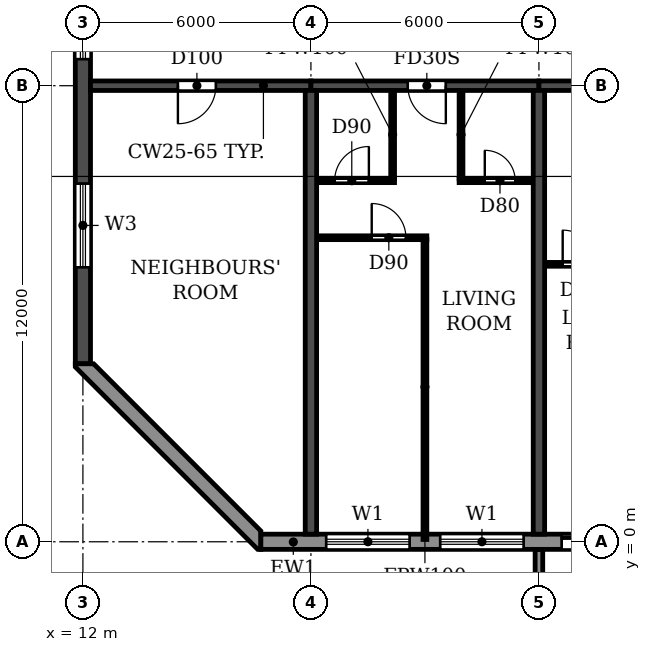
"""IFC4 building model, lengths in metres.
Left out: names, types, materials, properties, quantities, classifications, styles, units other than length and angle.
Written with IfcOpenShell. Run it as: python <this file> out.ifc"""

import sys

from ifc_helpers import new_model, si_unit, direction, frame, frame_2d, origin, place, context, subcontext, project, spatial, polyline, rectangle, outline, extrude, source, transform, mapped, element, fill, save


model = new_model("IFC4")
c1 = context("Model", 3, precision=1e-05, world=origin(), true_north=direction((0.0, 1.0)))
c2 = subcontext(c1, "Body", "Model", "MODEL_VIEW")
j1 = project(units=[si_unit("LENGTHUNIT", "METRE"), si_unit("PLANEANGLEUNIT", "RADIAN")], contexts=[c1])
p1 = place(None, origin())
s1 = spatial("IfcSite", under=j1, at=p1, CompositionType="ELEMENT")
p2 = place(p1, origin())
s2 = spatial("IfcBuilding", under=s1, at=p2, CompositionType="ELEMENT")
p3 = place(p2, frame((0.0, 0.0, 155.4)))
s3 = spatial("IfcBuildingStorey", under=s2, at=p3, CompositionType="ELEMENT", Elevation=155.4)
for number, where, z_axis, x_axis in (
    (1, (18.0, 0.2, 0.0), (0.0, 0.0, 1.0), (0.0, 1.0, 0.0)),
    (2, (24.0, 0.2, 0.0), (0.0, 0.0, 1.0), (0.0, 1.0, 0.0)),
):
    element("IfcWall", number, at=place(p3, frame(where, z_axis=z_axis, x_axis=x_axis)), inside=s3, PredefinedType="SHEAR", context=c2, shape_type="SweptSolid", body=[
        extrude(rectangle(XDim=11.675, YDim=0.3, at=frame_2d((5.837, 0.0))), origin(), (0.0, 0.0, 1.0), 3.0),
    ])
p4 = place(p3, frame((12.0, 4.683, 0.0), z_axis=(0.0, 0.0, 1.0), x_axis=(0.0, 1.0, 0.0)))
e3 = element("IfcWall", 3, at=p4, inside=s3, PredefinedType="SHEAR", context=c2, shape_type="SweptSolid", body=[
    extrude(rectangle(XDim=33.034, YDim=0.4, at=frame_2d((16.517, 0.0))), origin(), (0.0, 0.0, 1.0), 3.0),
])
p5 = place(p4, frame((23.817, 0.0, 0.9)))
e4 = element("IfcOpeningElement", 4, at=p5, cuts=e3, PredefinedType="OPENING", context=c2, shape_type="SweptSolid", body=[
    extrude(rectangle(XDim=1.2, YDim=1.5, at=frame_2d((0.6, 0.75))), frame((0.0, 0.21, 0.0), z_axis=(0.0, -1.0, 0.0), x_axis=(1.0, 0.0, 0.0)), (0.0, 0.0, 1.0), 0.42),
])
p6 = place(p4, frame((8.017, 0.0, 0.9)))
e5 = element("IfcOpeningElement", 5, at=p6, cuts=e3, PredefinedType="OPENING", context=c2, shape_type="SweptSolid", body=[
    extrude(rectangle(XDim=1.2, YDim=1.5, at=frame_2d((0.6, 0.75))), frame((0.0, 0.21, 0.0), z_axis=(0.0, -1.0, 0.0), x_axis=(1.0, 0.0, 0.0)), (0.0, 0.0, 1.0), 0.42),
])
p7 = place(p4, frame((28.293, 0.0, 0.6)))
e6 = element("IfcOpeningElement", 6, at=p7, cuts=e3, PredefinedType="OPENING", context=c2, shape_type="SweptSolid", body=[
    extrude(rectangle(XDim=2.2, YDim=1.8, at=frame_2d((1.1, 0.9))), frame((0.0, 0.21, 0.0), z_axis=(0.0, -1.0, 0.0), x_axis=(1.0, 0.0, 0.0)), (0.0, 0.0, 1.0), 0.42),
])
p8 = place(p4, frame((2.541, 0.0, 0.6)))
e7 = element("IfcOpeningElement", 7, at=p8, cuts=e3, PredefinedType="OPENING", context=c2, shape_type="SweptSolid", body=[
    extrude(rectangle(XDim=2.2, YDim=1.8, at=frame_2d((1.1, 0.9))), frame((0.0, 0.21, 0.0), z_axis=(0.0, -1.0, 0.0), x_axis=(1.0, 0.0, 0.0)), (0.0, 0.0, 1.0), 0.42),
])
p9 = place(p3, frame((12.2, 12.0, 0.0), z_axis=(0.0, 0.0, 1.0), x_axis=(1.0, 0.0, 0.0)))
e8 = element("IfcWall", 8, at=p9, inside=s3, PredefinedType="SHEAR", context=c2, shape_type="SweptSolid", body=[
    extrude(rectangle(XDim=5.8, YDim=0.25, at=frame_2d((2.9, 0.0))), origin(), (0.0, 0.0, 1.0), 2.4),
])
p10 = place(p9, frame((2.3, 0.0, 0.0)))
e9 = element("IfcOpeningElement", 9, at=p10, cuts=e8, PredefinedType="OPENING", context=c2, shape_type="SweptSolid", body=[
    extrude(rectangle(XDim=1.0, YDim=2.1, at=frame_2d((0.5, 1.05))), frame((0.0, 0.135, 0.0), z_axis=(0.0, -1.0, 0.0), x_axis=(1.0, 0.0, 0.0)), (0.0, 0.0, 1.0), 0.27),
])
p11 = place(p3, frame((18.0, 12.0, 0.0), z_axis=(0.0, 0.0, 1.0), x_axis=(1.0, 0.0, 0.0)))
e10 = element("IfcWall", 10, at=p11, inside=s3, PredefinedType="SHEAR", context=c2, shape_type="SweptSolid", body=[
    extrude(rectangle(XDim=6.0, YDim=0.25, at=frame_2d((3.0, 0.0))), origin(), (0.0, 0.0, 1.0), 2.4),
])
p12 = place(p11, frame((2.55, 0.0, 0.0)))
e11 = element("IfcOpeningElement", 11, at=p12, cuts=e10, PredefinedType="OPENING", context=c2, shape_type="SweptSolid", body=[
    extrude(rectangle(XDim=1.0, YDim=2.1, at=frame_2d((0.5, 1.05))), frame((0.0, 0.135, 0.0), z_axis=(0.0, -1.0, 0.0), x_axis=(1.0, 0.0, 0.0)), (0.0, 0.0, 1.0), 0.27),
])
p13 = place(p3, frame((24.0, 12.0, 0.0), z_axis=(0.0, 0.0, 1.0), x_axis=(1.0, 0.0, 0.0)))
e12 = element("IfcWall", 12, at=p13, inside=s3, PredefinedType="SHEAR", context=c2, shape_type="SweptSolid", body=[
    extrude(rectangle(XDim=6.0, YDim=0.25, at=frame_2d((3.0, 0.0))), origin(), (0.0, 0.0, 1.0), 2.4),
])
p14 = place(p13, frame((2.55, 0.0, 0.0)))
e13 = element("IfcOpeningElement", 13, at=p14, cuts=e12, PredefinedType="OPENING", context=c2, shape_type="SweptSolid", body=[
    extrude(rectangle(XDim=1.0, YDim=2.1, at=frame_2d((0.5, 1.05))), frame((0.0, 0.135, 0.0), z_axis=(0.0, -1.0, 0.0), x_axis=(1.0, 0.0, 0.0)), (0.0, 0.0, 1.0), 0.27),
])
p15 = place(p3, frame((16.683, 0.0, 0.0), z_axis=(0.0, 0.0, 1.0), x_axis=(1.0, 0.0, 0.0)))
e14 = element("IfcWall", 14, at=p15, inside=s3, PredefinedType="STANDARD", context=c2, shape_type="SweptSolid", body=[
    extrude(rectangle(XDim=68.634, YDim=0.4, at=frame_2d((34.317, 0.0))), origin(), (0.0, 0.0, 1.0), 3.0),
])
p16 = place(p15, frame((1.717, 0.0, 0.9)))
e15 = element("IfcOpeningElement", 15, at=p16, cuts=e14, PredefinedType="OPENING", context=c2, shape_type="SweptSolid", body=[
    extrude(rectangle(XDim=2.2, YDim=1.5, at=frame_2d((1.1, 0.75))), frame((0.0, 0.21, 0.0), z_axis=(0.0, -1.0, 0.0), x_axis=(1.0, 0.0, 0.0)), (0.0, 0.0, 1.0), 0.42),
])
p17 = place(p15, frame((4.717, 0.0, 0.9)))
e16 = element("IfcOpeningElement", 16, at=p17, cuts=e14, PredefinedType="OPENING", context=c2, shape_type="SweptSolid", body=[
    extrude(rectangle(XDim=2.2, YDim=1.5, at=frame_2d((1.1, 0.75))), frame((0.0, 0.21, 0.0), z_axis=(0.0, -1.0, 0.0), x_axis=(1.0, 0.0, 0.0)), (0.0, 0.0, 1.0), 0.42),
])
p18 = place(p15, frame((7.917, 0.0, 0.0)))
e17 = element("IfcOpeningElement", 17, at=p18, cuts=e14, PredefinedType="OPENING", context=c2, shape_type="SweptSolid", body=[
    extrude(rectangle(XDim=1.8, YDim=2.4, at=frame_2d((0.9, 1.2))), frame((0.0, 0.21, 0.0), z_axis=(0.0, -1.0, 0.0), x_axis=(1.0, 0.0, 0.0)), (0.0, 0.0, 1.0), 0.42),
])
p19 = place(p15, frame((10.717, 0.0, 0.9)))
e18 = element("IfcOpeningElement", 18, at=p19, cuts=e14, PredefinedType="OPENING", context=c2, shape_type="SweptSolid", body=[
    extrude(rectangle(XDim=2.2, YDim=1.5, at=frame_2d((1.1, 0.75))), frame((0.0, 0.21, 0.0), z_axis=(0.0, -1.0, 0.0), x_axis=(1.0, 0.0, 0.0)), (0.0, 0.0, 1.0), 0.42),
])
p20 = place(p15, frame((13.717, 0.0, 0.9)))
e19 = element("IfcOpeningElement", 19, at=p20, cuts=e14, PredefinedType="OPENING", context=c2, shape_type="SweptSolid", body=[
    extrude(rectangle(XDim=2.2, YDim=1.5, at=frame_2d((1.1, 0.75))), frame((0.0, 0.21, 0.0), z_axis=(0.0, -1.0, 0.0), x_axis=(1.0, 0.0, 0.0)), (0.0, 0.0, 1.0), 0.42),
])
p21 = place(p15, frame((16.717, 0.0, 0.9)))
e20 = element("IfcOpeningElement", 20, at=p21, cuts=e14, PredefinedType="OPENING", context=c2, shape_type="SweptSolid", body=[
    extrude(rectangle(XDim=2.2, YDim=1.5, at=frame_2d((1.1, 0.75))), frame((0.0, 0.21, 0.0), z_axis=(0.0, -1.0, 0.0), x_axis=(1.0, 0.0, 0.0)), (0.0, 0.0, 1.0), 0.42),
])
p22 = place(p15, frame((19.717, 0.0, 0.9)))
e21 = element("IfcOpeningElement", 21, at=p22, cuts=e14, PredefinedType="OPENING", context=c2, shape_type="SweptSolid", body=[
    extrude(rectangle(XDim=2.2, YDim=1.5, at=frame_2d((1.1, 0.75))), frame((0.0, 0.21, 0.0), z_axis=(0.0, -1.0, 0.0), x_axis=(1.0, 0.0, 0.0)), (0.0, 0.0, 1.0), 0.42),
])
p23 = place(p15, frame((22.917, 0.0, 0.0)))
e22 = element("IfcOpeningElement", 22, at=p23, cuts=e14, PredefinedType="OPENING", context=c2, shape_type="SweptSolid", body=[
    extrude(rectangle(XDim=1.8, YDim=2.4, at=frame_2d((0.9, 1.2))), frame((0.0, 0.21, 0.0), z_axis=(0.0, -1.0, 0.0), x_axis=(1.0, 0.0, 0.0)), (0.0, 0.0, 1.0), 0.42),
])
p24 = place(p15, frame((25.717, 0.0, 0.9)))
e23 = element("IfcOpeningElement", 23, at=p24, cuts=e14, PredefinedType="OPENING", context=c2, shape_type="SweptSolid", body=[
    extrude(rectangle(XDim=2.2, YDim=1.5, at=frame_2d((1.1, 0.75))), frame((0.0, 0.21, 0.0), z_axis=(0.0, -1.0, 0.0), x_axis=(1.0, 0.0, 0.0)), (0.0, 0.0, 1.0), 0.42),
])
p25 = place(p15, frame((28.717, 0.0, 0.9)))
e24 = element("IfcOpeningElement", 24, at=p25, cuts=e14, PredefinedType="OPENING", context=c2, shape_type="SweptSolid", body=[
    extrude(rectangle(XDim=2.2, YDim=1.5, at=frame_2d((1.1, 0.75))), frame((0.0, 0.21, 0.0), z_axis=(0.0, -1.0, 0.0), x_axis=(1.0, 0.0, 0.0)), (0.0, 0.0, 1.0), 0.42),
])
p26 = place(p15, frame((31.917, 0.0, 0.0)))
e25 = element("IfcOpeningElement", 25, at=p26, cuts=e14, PredefinedType="OPENING", context=c2, shape_type="SweptSolid", body=[
    extrude(rectangle(XDim=1.8, YDim=2.4, at=frame_2d((0.9, 1.2))), frame((0.0, 0.21, 0.0), z_axis=(0.0, -1.0, 0.0), x_axis=(1.0, 0.0, 0.0)), (0.0, 0.0, 1.0), 0.42),
])
p27 = place(p15, frame((34.717, 0.0, 0.9)))
e26 = element("IfcOpeningElement", 26, at=p27, cuts=e14, PredefinedType="OPENING", context=c2, shape_type="SweptSolid", body=[
    extrude(rectangle(XDim=2.2, YDim=1.5, at=frame_2d((1.1, 0.75))), frame((0.0, 0.21, 0.0), z_axis=(0.0, -1.0, 0.0), x_axis=(1.0, 0.0, 0.0)), (0.0, 0.0, 1.0), 0.42),
])
p28 = place(p15, frame((37.717, 0.0, 0.9)))
e27 = element("IfcOpeningElement", 27, at=p28, cuts=e14, PredefinedType="OPENING", context=c2, shape_type="SweptSolid", body=[
    extrude(rectangle(XDim=2.2, YDim=1.5, at=frame_2d((1.1, 0.75))), frame((0.0, 0.21, 0.0), z_axis=(0.0, -1.0, 0.0), x_axis=(1.0, 0.0, 0.0)), (0.0, 0.0, 1.0), 0.42),
])
p29 = place(p15, frame((40.717, 0.0, 0.9)))
e28 = element("IfcOpeningElement", 28, at=p29, cuts=e14, PredefinedType="OPENING", context=c2, shape_type="SweptSolid", body=[
    extrude(rectangle(XDim=2.2, YDim=1.5, at=frame_2d((1.1, 0.75))), frame((0.0, 0.21, 0.0), z_axis=(0.0, -1.0, 0.0), x_axis=(1.0, 0.0, 0.0)), (0.0, 0.0, 1.0), 0.42),
])
p30 = place(p15, frame((43.717, 0.0, 0.9)))
e29 = element("IfcOpeningElement", 29, at=p30, cuts=e14, PredefinedType="OPENING", context=c2, shape_type="SweptSolid", body=[
    extrude(rectangle(XDim=2.2, YDim=1.5, at=frame_2d((1.1, 0.75))), frame((0.0, 0.21, 0.0), z_axis=(0.0, -1.0, 0.0), x_axis=(1.0, 0.0, 0.0)), (0.0, 0.0, 1.0), 0.42),
])
p31 = place(p15, frame((46.917, 0.0, 0.0)))
e30 = element("IfcOpeningElement", 30, at=p31, cuts=e14, PredefinedType="OPENING", context=c2, shape_type="SweptSolid", body=[
    extrude(rectangle(XDim=1.8, YDim=2.4, at=frame_2d((0.9, 1.2))), frame((0.0, 0.21, 0.0), z_axis=(0.0, -1.0, 0.0), x_axis=(1.0, 0.0, 0.0)), (0.0, 0.0, 1.0), 0.42),
])
p32 = place(p15, frame((49.717, 0.0, 0.9)))
e31 = element("IfcOpeningElement", 31, at=p32, cuts=e14, PredefinedType="OPENING", context=c2, shape_type="SweptSolid", body=[
    extrude(rectangle(XDim=2.2, YDim=1.5, at=frame_2d((1.1, 0.75))), frame((0.0, 0.21, 0.0), z_axis=(0.0, -1.0, 0.0), x_axis=(1.0, 0.0, 0.0)), (0.0, 0.0, 1.0), 0.42),
])
p33 = place(p15, frame((52.717, 0.0, 0.9)))
e32 = element("IfcOpeningElement", 32, at=p33, cuts=e14, PredefinedType="OPENING", context=c2, shape_type="SweptSolid", body=[
    extrude(rectangle(XDim=2.2, YDim=1.5, at=frame_2d((1.1, 0.75))), frame((0.0, 0.21, 0.0), z_axis=(0.0, -1.0, 0.0), x_axis=(1.0, 0.0, 0.0)), (0.0, 0.0, 1.0), 0.42),
])
p34 = place(p15, frame((55.717, 0.0, 0.9)))
e33 = element("IfcOpeningElement", 33, at=p34, cuts=e14, PredefinedType="OPENING", context=c2, shape_type="SweptSolid", body=[
    extrude(rectangle(XDim=2.2, YDim=1.5, at=frame_2d((1.1, 0.75))), frame((0.0, 0.21, 0.0), z_axis=(0.0, -1.0, 0.0), x_axis=(1.0, 0.0, 0.0)), (0.0, 0.0, 1.0), 0.42),
])
p35 = place(p15, frame((58.917, 0.0, 0.0)))
e34 = element("IfcOpeningElement", 34, at=p35, cuts=e14, PredefinedType="OPENING", context=c2, shape_type="SweptSolid", body=[
    extrude(rectangle(XDim=1.8, YDim=2.4, at=frame_2d((0.9, 1.2))), frame((0.0, 0.21, 0.0), z_axis=(0.0, -1.0, 0.0), x_axis=(1.0, 0.0, 0.0)), (0.0, 0.0, 1.0), 0.42),
])
p36 = place(p15, frame((61.717, 0.0, 0.9)))
e35 = element("IfcOpeningElement", 35, at=p36, cuts=e14, PredefinedType="OPENING", context=c2, shape_type="SweptSolid", body=[
    extrude(rectangle(XDim=2.2, YDim=1.5, at=frame_2d((1.1, 0.75))), frame((0.0, 0.21, 0.0), z_axis=(0.0, -1.0, 0.0), x_axis=(1.0, 0.0, 0.0)), (0.0, 0.0, 1.0), 0.42),
])
p37 = place(p15, frame((64.717, 0.0, 0.9)))
e36 = element("IfcOpeningElement", 36, at=p37, cuts=e14, PredefinedType="OPENING", context=c2, shape_type="SweptSolid", body=[
    extrude(rectangle(XDim=2.2, YDim=1.5, at=frame_2d((1.1, 0.75))), frame((0.0, 0.21, 0.0), z_axis=(0.0, -1.0, 0.0), x_axis=(1.0, 0.0, 0.0)), (0.0, 0.0, 1.0), 0.42),
])
p38 = place(p3, origin())
e37 = element("IfcWall", 37, at=p38, inside=s3, PredefinedType="STANDARD", context=c2, shape_type="SweptSolid", body=[
    extrude(outline(polyline([(11.8, 4.683), (11.8, 4.6), (16.6, -0.2), (16.683, -0.2), (16.683, 0.283), (12.283, 4.683), (11.8, 4.683)])), origin(), (0.0, 0.0, 1.0), 3.0),
])
m1 = source(origin(), c2, "Body", "SweptSolid", [
    extrude(outline(polyline([(0.0, 0.0), (0.2, 0.0), (0.2, 1.65), (0.0, 1.65), (0.0, 0.0)])), origin(), (0.0, 0.0, 1.0), 3.1),
])
p39 = place(p3, frame((23.9, -1.85, 0.0)))
e38 = element("IfcWall", 38, at=p39, inside=s3, PredefinedType="STANDARD", context=c2, shape_type="MappedRepresentation", body=[
    mapped(m1, transform((0.0, 0.0, 0.0))),
])
p40 = place(p3, frame((24.16, 7.3, 0.0), z_axis=(0.0, 0.0, 1.0), x_axis=(1.0, 0.0, 0.0)))
e39 = element("IfcWall", 39, at=p40, inside=s3, PredefinedType="PARTITIONING", context=c2, shape_type="SweptSolid", body=[
    extrude(rectangle(XDim=2.04, YDim=0.1, at=frame_2d((1.02, 0.0))), origin(), (0.0, 0.0, 1.0), 3.0),
])
p41 = place(p40, frame((0.465, 0.0, 0.0)))
e40 = element("IfcOpeningElement", 40, at=p41, cuts=e39, PredefinedType="OPENING", context=c2, shape_type="SweptSolid", body=[
    extrude(rectangle(XDim=0.9, YDim=2.1, at=frame_2d((0.45, 1.05))), frame((0.0, 0.06, 0.0), z_axis=(0.0, -1.0, 0.0), x_axis=(1.0, 0.0, 0.0)), (0.0, 0.0, 1.0), 0.12),
])
p42 = place(p3, frame((18.16, 8.0, 0.0), z_axis=(0.0, 0.0, 1.0), x_axis=(1.0, 0.0, 0.0)))
e41 = element("IfcWall", 41, at=p42, inside=s3, PredefinedType="PARTITIONING", context=c2, shape_type="SweptSolid", body=[
    extrude(rectangle(XDim=2.89, YDim=0.1, at=frame_2d((1.445, 0.0))), origin(), (0.0, 0.0, 1.0), 3.0),
])
p43 = place(p42, frame((1.44, 0.0, 0.0)))
e42 = element("IfcOpeningElement", 42, at=p43, cuts=e41, PredefinedType="OPENING", context=c2, shape_type="SweptSolid", body=[
    extrude(rectangle(XDim=0.9, YDim=2.1, at=frame_2d((0.45, 1.05))), frame((0.0, 0.06, 0.0), z_axis=(0.0, -1.0, 0.0), x_axis=(1.0, 0.0, 0.0)), (0.0, 0.0, 1.0), 0.12),
])
p44 = place(p3, frame((18.16, 9.5, 0.0), z_axis=(0.0, 0.0, 1.0), x_axis=(1.0, 0.0, 0.0)))
e43 = element("IfcWall", 43, at=p44, inside=s3, PredefinedType="PARTITIONING", context=c2, shape_type="SweptSolid", body=[
    extrude(rectangle(XDim=2.04, YDim=0.1, at=frame_2d((1.02, 0.0))), origin(), (0.0, 0.0, 1.0), 3.0),
])
p45 = place(p44, frame((0.465, 0.0, 0.0)))
e44 = element("IfcOpeningElement", 44, at=p45, cuts=e43, PredefinedType="OPENING", context=c2, shape_type="SweptSolid", body=[
    extrude(rectangle(XDim=0.9, YDim=2.1, at=frame_2d((0.45, 1.05))), frame((0.0, 0.06, 0.0), z_axis=(0.0, -1.0, 0.0), x_axis=(1.0, 0.0, 0.0)), (0.0, 0.0, 1.0), 0.12),
])
p46 = place(p3, frame((21.9, 9.5, 0.0), z_axis=(0.0, 0.0, 1.0), x_axis=(1.0, 0.0, 0.0)))
e45 = element("IfcWall", 45, at=p46, inside=s3, PredefinedType="PARTITIONING", context=c2, shape_type="SweptSolid", body=[
    extrude(rectangle(XDim=1.94, YDim=0.1, at=frame_2d((0.97, 0.0))), origin(), (0.0, 0.0, 1.0), 3.0),
])
p47 = place(p46, frame((0.675, 0.0, 0.0)))
e46 = element("IfcOpeningElement", 46, at=p47, cuts=e45, PredefinedType="OPENING", context=c2, shape_type="SweptSolid", body=[
    extrude(rectangle(XDim=0.8, YDim=2.1, at=frame_2d((0.4, 1.05))), frame((0.0, 0.06, 0.0), z_axis=(0.0, -1.0, 0.0), x_axis=(1.0, 0.0, 0.0)), (0.0, 0.0, 1.0), 0.12),
])
p48 = place(p3, frame((20.15, 9.55, 0.0), z_axis=(0.0, 0.0, 1.0), x_axis=(0.0, 1.0, 0.0)))
e47 = element("IfcWall", 47, at=p48, inside=s3, PredefinedType="PARTITIONING", context=c2, shape_type="SweptSolid", body=[
    extrude(rectangle(XDim=2.315, YDim=0.1, at=frame_2d((1.157, 0.0))), origin(), (0.0, 0.0, 1.0), 3.0),
])
p49 = place(p3, frame((21.0, 0.06, 0.0), z_axis=(0.0, 0.0, 1.0), x_axis=(0.0, 1.0, 0.0)))
e48 = element("IfcWall", 48, at=p49, inside=s3, PredefinedType="PARTITIONING", context=c2, shape_type="SweptSolid", body=[
    extrude(rectangle(XDim=7.89, YDim=0.1, at=frame_2d((3.945, 0.0))), origin(), (0.0, 0.0, 1.0), 3.0),
])
p50 = place(p3, frame((21.95, 9.55, 0.0), z_axis=(0.0, 0.0, 1.0), x_axis=(0.0, 1.0, 0.0)))
e49 = element("IfcWall", 49, at=p50, inside=s3, PredefinedType="PARTITIONING", context=c2, shape_type="SweptSolid", body=[
    extrude(rectangle(XDim=2.315, YDim=0.1, at=frame_2d((1.157, 0.0))), origin(), (0.0, 0.0, 1.0), 3.0),
])
p51 = place(p16, origin())
e50 = element("IfcWindow", 50, at=p51, inside=s3, PartitioningType="DOUBLE_PANEL_HORIZONTAL", PredefinedType="WINDOW", context=c2, shape_type="SweptSolid", body=[
    extrude(rectangle(XDim=2.2, YDim=1.5, at=frame_2d((1.1, 0.75))), frame((0.0, 0.03, 0.0), z_axis=(0.0, -1.0, 0.0), x_axis=(1.0, 0.0, 0.0)), (0.0, 0.0, 1.0), 0.06),
])
fill(e15, e50)
p52 = place(p17, origin())
e51 = element("IfcWindow", 51, at=p52, inside=s3, PartitioningType="DOUBLE_PANEL_HORIZONTAL", PredefinedType="WINDOW", context=c2, shape_type="SweptSolid", body=[
    extrude(rectangle(XDim=2.2, YDim=1.5, at=frame_2d((1.1, 0.75))), frame((0.0, 0.03, 0.0), z_axis=(0.0, -1.0, 0.0), x_axis=(1.0, 0.0, 0.0)), (0.0, 0.0, 1.0), 0.06),
])
fill(e16, e51)
p53 = place(p18, origin())
e52 = element("IfcDoor", 52, at=p53, inside=s3, OperationType="DOUBLE_DOOR_SLIDING", PredefinedType="DOOR", context=c2, shape_type="SweptSolid", body=[
    extrude(rectangle(XDim=1.8, YDim=2.4, at=frame_2d((0.9, 1.2))), frame((0.0, 0.025, 0.0), z_axis=(0.0, -1.0, 0.0), x_axis=(1.0, 0.0, 0.0)), (0.0, 0.0, 1.0), 0.05),
])
fill(e17, e52)
p54 = place(p6, origin())
e53 = element("IfcWindow", 53, at=p54, inside=s3, PartitioningType="SINGLE_PANEL", PredefinedType="WINDOW", context=c2, shape_type="SweptSolid", body=[
    extrude(rectangle(XDim=1.2, YDim=1.5, at=frame_2d((0.6, 0.75))), frame((0.0, 0.03, 0.0), z_axis=(0.0, -1.0, 0.0), x_axis=(1.0, 0.0, 0.0)), (0.0, 0.0, 1.0), 0.06),
])
fill(e5, e53)
p55 = place(p8, origin())
e54 = element("IfcWindow", 54, at=p55, inside=s3, PartitioningType="DOUBLE_PANEL_HORIZONTAL", PredefinedType="WINDOW", context=c2, shape_type="SweptSolid", body=[
    extrude(rectangle(XDim=2.2, YDim=1.8, at=frame_2d((1.1, 0.9))), frame((0.0, 0.03, 0.0), z_axis=(0.0, -1.0, 0.0), x_axis=(1.0, 0.0, 0.0)), (0.0, 0.0, 1.0), 0.06),
])
fill(e7, e54)
p56 = place(p10, frame((1.0, 0.0, 0.0), z_axis=(0.0, 0.0, 1.0), x_axis=(-1.0, 0.0, 0.0)))
e55 = element("IfcDoor", 55, at=p56, inside=s3, OperationType="SINGLE_SWING_RIGHT", PredefinedType="DOOR", context=c2, shape_type="SweptSolid", body=[
    extrude(rectangle(XDim=1.0, YDim=2.1, at=frame_2d((0.5, 1.05))), frame((0.0, 0.025, 0.0), z_axis=(0.0, -1.0, 0.0), x_axis=(1.0, 0.0, 0.0)), (0.0, 0.0, 1.0), 0.05),
])
fill(e9, e55)
p57 = place(p45, origin())
e56 = element("IfcDoor", 56, at=p57, inside=s3, OperationType="SINGLE_SWING_RIGHT", PredefinedType="DOOR", context=c2, shape_type="SweptSolid", body=[
    extrude(rectangle(XDim=0.9, YDim=2.1, at=frame_2d((0.45, 1.05))), frame((0.0, 0.025, 0.0), z_axis=(0.0, -1.0, 0.0), x_axis=(1.0, 0.0, 0.0)), (0.0, 0.0, 1.0), 0.05),
])
fill(e44, e56)
p58 = place(p43, origin())
e57 = element("IfcDoor", 57, at=p58, inside=s3, OperationType="SINGLE_SWING_LEFT", PredefinedType="DOOR", context=c2, shape_type="SweptSolid", body=[
    extrude(rectangle(XDim=0.9, YDim=2.1, at=frame_2d((0.45, 1.05))), frame((0.0, 0.025, 0.0), z_axis=(0.0, -1.0, 0.0), x_axis=(1.0, 0.0, 0.0)), (0.0, 0.0, 1.0), 0.05),
])
fill(e42, e57)
p59 = place(p12, frame((1.0, 0.0, 0.0), z_axis=(0.0, 0.0, 1.0), x_axis=(-1.0, 0.0, 0.0)))
e58 = element("IfcDoor", 58, at=p59, inside=s3, OperationType="SINGLE_SWING_LEFT", PredefinedType="DOOR", context=c2, shape_type="SweptSolid", body=[
    extrude(rectangle(XDim=1.0, YDim=2.1, at=frame_2d((0.5, 1.05))), frame((0.0, 0.025, 0.0), z_axis=(0.0, -1.0, 0.0), x_axis=(1.0, 0.0, 0.0)), (0.0, 0.0, 1.0), 0.05),
])
fill(e11, e58)
p60 = place(p47, origin())
e59 = element("IfcDoor", 59, at=p60, inside=s3, OperationType="SINGLE_SWING_LEFT", PredefinedType="DOOR", context=c2, shape_type="SweptSolid", body=[
    extrude(rectangle(XDim=0.8, YDim=2.1, at=frame_2d((0.4, 1.05))), frame((0.0, 0.025, 0.0), z_axis=(0.0, -1.0, 0.0), x_axis=(1.0, 0.0, 0.0)), (0.0, 0.0, 1.0), 0.05),
])
fill(e46, e59)
p61 = place(p41, origin())
e60 = element("IfcDoor", 60, at=p61, inside=s3, OperationType="SINGLE_SWING_LEFT", PredefinedType="DOOR", context=c2, shape_type="SweptSolid", body=[
    extrude(rectangle(XDim=0.9, YDim=2.1, at=frame_2d((0.45, 1.05))), frame((0.0, 0.025, 0.0), z_axis=(0.0, -1.0, 0.0), x_axis=(1.0, 0.0, 0.0)), (0.0, 0.0, 1.0), 0.05),
])
fill(e40, e60)
save(model, sys.argv[1])
